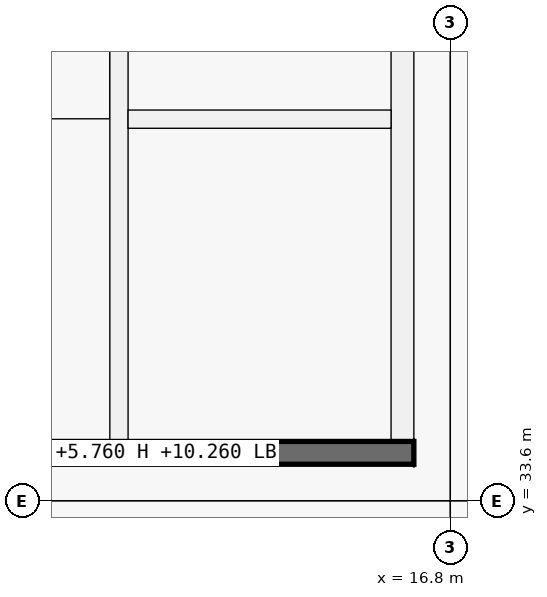
"""IFC4 building model, lengths in metres.
Left out: names, types, materials, properties, quantities, classifications, styles, units other than length and angle.
Written with IfcOpenShell. Run it as: python <this file> out.ifc"""

import sys

from ifc_helpers import new_model, si_unit, direction, frame, frame_2d, origin, origin_2d, place, context, subcontext, project, spatial, rectangle, extrude, element, fill, save


model = new_model("IFC4")
c1 = context("Model", 3, precision=1e-05, world=origin(), true_north=direction((0.0, 1.0)))
c2 = subcontext(c1, "Body", "Model", "MODEL_VIEW")
j1 = project(units=[si_unit("LENGTHUNIT", "METRE"), si_unit("PLANEANGLEUNIT", "RADIAN")], contexts=[c1])
p1 = place(None, origin())
s1 = spatial("IfcSite", under=j1, at=p1, CompositionType="ELEMENT")
p2 = place(p1, origin())
s2 = spatial("IfcBuilding", under=s1, at=p2, CompositionType="ELEMENT")
p3 = place(p2, frame((0.0, 0.0, 5.76)))
s3 = spatial("IfcBuildingStorey", under=s2, at=p3, CompositionType="ELEMENT", Elevation=5.76)
p4 = place(p3, frame((16.8, 33.6, 0.0), z_axis=(0.0, 0.0, 1.0), x_axis=(1.0, 0.0, 0.0)))
e1 = element("IfcColumn", 1, at=p4, inside=s3, PredefinedType="COLUMN", context=c2, shape_type="SweptSolid", body=[
    extrude(rectangle(XDim=0.8, YDim=0.8, at=origin_2d()), origin(), (0.0, 0.0, 1.0), 4.5),
])
p5 = place(p3, frame((16.32, 34.23, 0.0), z_axis=(0.0, 0.0, 1.0), x_axis=(-1.0, 0.0, 0.0)))
e2 = element("IfcWall", 2, at=p5, inside=s3, PredefinedType="SHEAR", context=c2, shape_type="SweptSolid", body=[
    extrude(rectangle(XDim=7.44, YDim=0.3, at=frame_2d((3.72, 0.0))), origin(), (0.0, 0.0, 1.0), 4.5),
])
p6 = place(p5, frame((1.28, 0.0, 0.0)))
e3 = element("IfcOpeningElement", 3, at=p6, cuts=e2, PredefinedType="OPENING", context=c2, shape_type="SweptSolid", body=[
    extrude(rectangle(XDim=1.5, YDim=2.15, at=frame_2d((0.75, 1.075))), frame((0.0, 0.15, 0.0), z_axis=(0.0, -1.0, 0.0), x_axis=(1.0, 0.0, 0.0)), (0.0, 0.0, 1.0), 0.3),
])
p7 = place(p3, frame((16.17, 41.22, 0.0), z_axis=(0.0, 0.0, 1.0), x_axis=(0.0, -1.0, 0.0)))
e4 = element("IfcWall", 4, at=p7, inside=s3, PredefinedType="SHEAR", context=c2, shape_type="SweptSolid", body=[
    extrude(rectangle(XDim=6.84, YDim=0.3, at=frame_2d((3.42, 0.0))), origin(), (0.0, 0.0, 1.0), 4.5),
])
p8 = place(p3, frame((12.44, 34.38, 0.0), z_axis=(0.0, 0.0, 1.0), x_axis=(0.0, 1.0, 0.0)))
e5 = element("IfcWall", 5, at=p8, inside=s3, PredefinedType="SHEAR", context=c2, shape_type="SweptSolid", body=[
    extrude(rectangle(XDim=6.84, YDim=0.24, at=frame_2d((3.42, 0.0))), origin(), (0.0, 0.0, 1.0), 4.5),
])
p9 = place(p8, frame((0.12, 0.0, 0.0)))
e6 = element("IfcOpeningElement", 6, at=p9, cuts=e5, PredefinedType="OPENING", context=c2, shape_type="SweptSolid", body=[
    extrude(rectangle(XDim=1.0, YDim=2.15, at=frame_2d((0.5, 1.075))), frame((0.0, 0.12, 0.0), z_axis=(0.0, -1.0, 0.0), x_axis=(1.0, 0.0, 0.0)), (0.0, 0.0, 1.0), 0.24),
])
p10 = place(p3, frame((12.56, 38.62, 0.0), z_axis=(0.0, 0.0, 1.0), x_axis=(1.0, 0.0, 0.0)))
e7 = element("IfcWall", 7, at=p10, inside=s3, PredefinedType="SHEAR", context=c2, shape_type="SweptSolid", body=[
    extrude(rectangle(XDim=3.46, YDim=0.24, at=frame_2d((1.73, 0.0))), origin(), (0.0, 0.0, 1.0), 4.5),
])
p11 = place(p10, frame((1.18, 0.0, 0.0)))
e8 = element("IfcOpeningElement", 8, at=p11, cuts=e7, PredefinedType="OPENING", context=c2, shape_type="SweptSolid", body=[
    extrude(rectangle(XDim=1.1, YDim=2.15, at=frame_2d((0.55, 1.075))), frame((0.0, 0.12, 0.0), z_axis=(0.0, -1.0, 0.0), x_axis=(1.0, 0.0, 0.0)), (0.0, 0.0, 1.0), 0.24),
])
p12 = place(p9, origin())
e9 = element("IfcDoor", 9, at=p12, inside=s3, OperationType="SINGLE_SWING_RIGHT", PredefinedType="DOOR", context=c2, shape_type="SweptSolid", body=[
    extrude(rectangle(XDim=1.0, YDim=2.15, at=frame_2d((0.5, 1.075))), frame((0.0, 0.025, 0.0), z_axis=(0.0, -1.0, 0.0), x_axis=(1.0, 0.0, 0.0)), (0.0, 0.0, 1.0), 0.05),
])
fill(e6, e9)
p13 = place(p6, origin())
e10 = element("IfcDoor", 10, at=p13, inside=s3, OperationType="DOUBLE_DOOR_SINGLE_SWING", PredefinedType="DOOR", context=c2, shape_type="SweptSolid", body=[
    extrude(rectangle(XDim=1.5, YDim=2.15, at=frame_2d((0.75, 1.075))), frame((0.0, 0.025, 0.0), z_axis=(0.0, -1.0, 0.0), x_axis=(1.0, 0.0, 0.0)), (0.0, 0.0, 1.0), 0.05),
])
fill(e3, e10)
p14 = place(p11, origin())
e11 = element("IfcDoor", 11, at=p14, inside=s3, OperationType="DOUBLE_DOOR_SLIDING", PredefinedType="DOOR", context=c2, shape_type="SweptSolid", body=[
    extrude(rectangle(XDim=1.1, YDim=2.15, at=frame_2d((0.55, 1.075))), frame((0.0, 0.025, 0.0), z_axis=(0.0, -1.0, 0.0), x_axis=(1.0, 0.0, 0.0)), (0.0, 0.0, 1.0), 0.05),
])
fill(e8, e11)
save(model, sys.argv[1])
